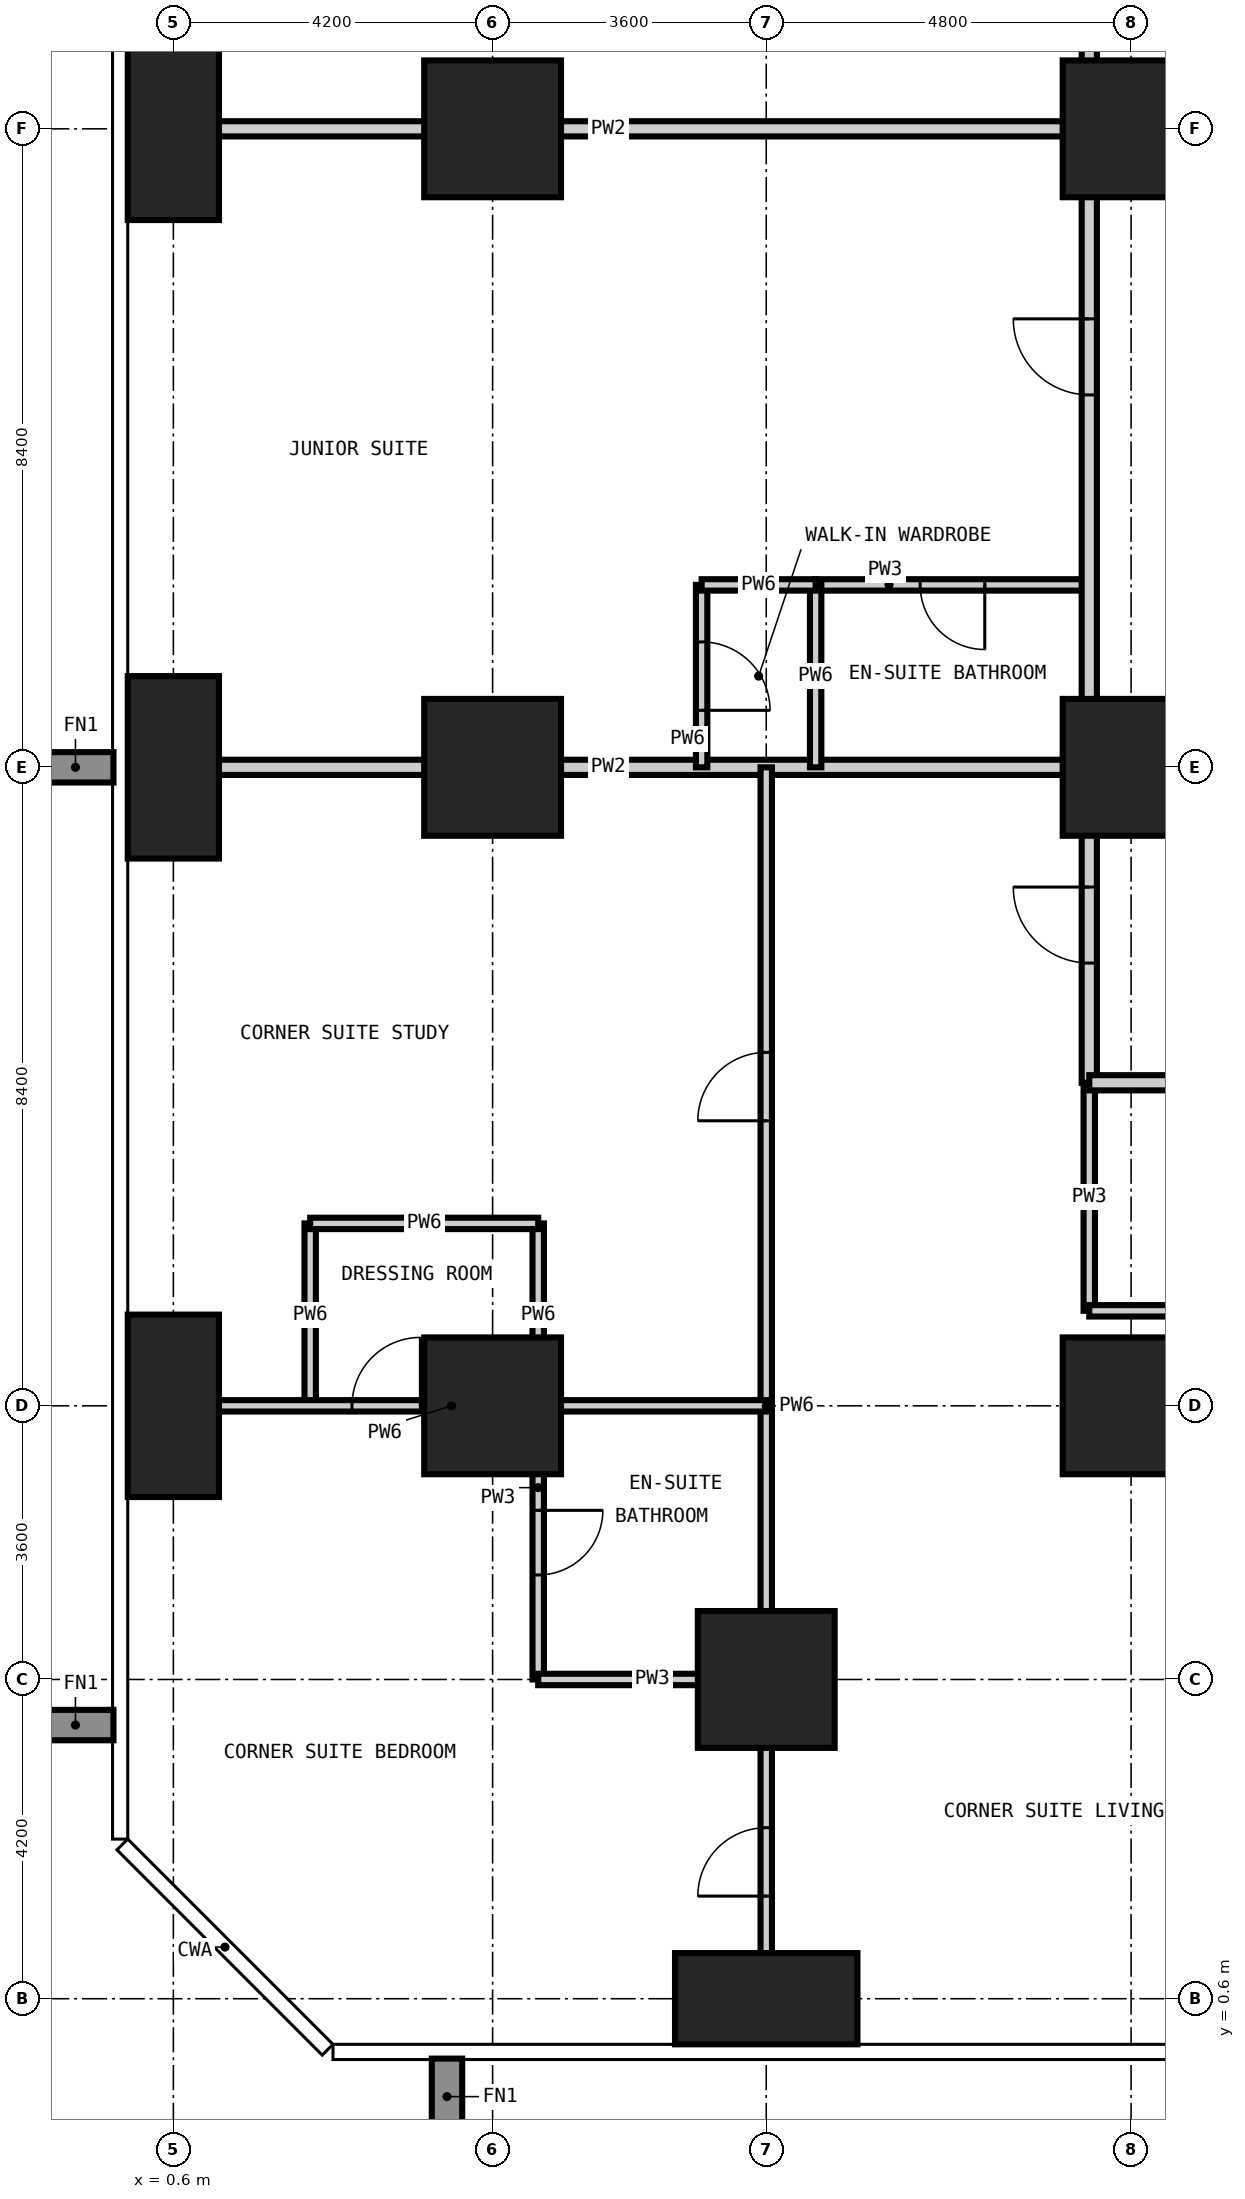
"""IFC4 building model, lengths in metres.
Left out: names, types, materials, properties, quantities, classifications, styles, units other than length and angle.
Written with IfcOpenShell. Run it as: python <this file> out.ifc"""

import sys

from ifc_helpers import new_model, si_unit, direction, frame, frame_2d, origin, origin_2d, place, context, subcontext, project, spatial, rectangle, extrude, element, fill, save


model = new_model("IFC4")
c1 = context("Model", 3, precision=1e-05, world=origin(), true_north=direction((0.0, 1.0)))
c2 = subcontext(c1, "Body", "Model", "MODEL_VIEW")
j1 = project(units=[si_unit("LENGTHUNIT", "METRE"), si_unit("PLANEANGLEUNIT", "RADIAN")], contexts=[c1])
p1 = place(None, origin())
s1 = spatial("IfcSite", under=j1, at=p1, CompositionType="ELEMENT")
p2 = place(p1, origin())
s2 = spatial("IfcBuilding", under=s1, at=p2, CompositionType="ELEMENT")
p3 = place(p2, frame((0.0, 0.0, 70.2)))
s3 = spatial("IfcBuildingStorey", under=s2, at=p3, CompositionType="ELEMENT", Elevation=70.2)
for number, where, z_axis, x_axis in (
    (1, (0.6, 8.4, -0.35), (0.0, 0.0, 1.0), (1.0, 0.0, 0.0)),
    (2, (0.6, 16.8, -0.35), (0.0, 0.0, 1.0), (1.0, 0.0, 0.0)),
    (3, (0.6, 25.2, -0.35), (0.0, 0.0, 1.0), (1.0, 0.0, 0.0)),
):
    element("IfcColumn", number, at=place(p3, frame(where, z_axis=z_axis, x_axis=x_axis)), inside=s3, PredefinedType="COLUMN", context=c2, shape_type="SweptSolid", body=[
        extrude(rectangle(XDim=1.2, YDim=2.4, at=origin_2d()), origin(), (0.0, 0.0, 1.0), 3.6),
    ])
for number, where, z_axis, x_axis in (
    (4, (4.8, 8.4, -0.35), (0.0, 0.0, 1.0), (1.0, 0.0, 0.0)),
    (5, (4.8, 16.8, -0.35), (0.0, 0.0, 1.0), (1.0, 0.0, 0.0)),
    (6, (4.8, 25.2, -0.35), (0.0, 0.0, 1.0), (1.0, 0.0, 0.0)),
):
    element("IfcColumn", number, at=place(p3, frame(where, z_axis=z_axis, x_axis=x_axis)), inside=s3, PredefinedType="COLUMN", context=c2, shape_type="SweptSolid", body=[
        extrude(rectangle(XDim=1.8, YDim=1.8, at=origin_2d()), origin(), (0.0, 0.0, 1.0), 3.6),
    ])
p4 = place(p3, frame((8.4, 0.6, -0.35), z_axis=(0.0, 0.0, 1.0), x_axis=(1.0, 0.0, 0.0)))
e7 = element("IfcColumn", 7, at=p4, inside=s3, PredefinedType="COLUMN", context=c2, shape_type="SweptSolid", body=[
    extrude(rectangle(XDim=2.4, YDim=1.2, at=origin_2d()), origin(), (0.0, 0.0, 1.0), 3.6),
])
for number, where, z_axis, x_axis in (
    (8, (8.4, 4.8, -0.35), (0.0, 0.0, 1.0), (1.0, 0.0, 0.0)),
    (9, (13.2, 8.4, -0.35), (0.0, 0.0, 1.0), (1.0, 0.0, 0.0)),
    (10, (13.2, 16.8, -0.35), (0.0, 0.0, 1.0), (1.0, 0.0, 0.0)),
    (11, (13.2, 25.2, -0.35), (0.0, 0.0, 1.0), (1.0, 0.0, 0.0)),
):
    element("IfcColumn", number, at=place(p3, frame(where, z_axis=z_axis, x_axis=x_axis)), inside=s3, PredefinedType="COLUMN", context=c2, shape_type="SweptSolid", body=[
        extrude(rectangle(XDim=1.8, YDim=1.8, at=origin_2d()), origin(), (0.0, 0.0, 1.0), 3.6),
    ])
p5 = place(p3, frame((5.4, 4.8, 0.0), z_axis=(0.0, 0.0, 1.0), x_axis=(0.0, 1.0, 0.0)))
e12 = element("IfcWall", 12, at=p5, inside=s3, PredefinedType="PARTITIONING", context=c2, shape_type="SweptSolid", body=[
    extrude(rectangle(XDim=3.6, YDim=0.15, at=frame_2d((1.8, 0.0))), origin(), (0.0, 0.0, 1.0), 3.25),
])
p6 = place(p5, frame((1.375, 0.0, 0.0)))
e13 = element("IfcOpeningElement", 13, at=p6, cuts=e12, PredefinedType="OPENING", context=c2, shape_type="SweptSolid", body=[
    extrude(rectangle(XDim=0.85, YDim=2.1, at=frame_2d((0.425, 1.05))), frame((0.0, 0.085, 0.0), z_axis=(0.0, -1.0, 0.0), x_axis=(1.0, 0.0, 0.0)), (0.0, 0.0, 1.0), 0.17),
])
for number, where, z_axis, x_axis in (
    (14, (12.65, 9.65, 0.0), (0.0, 0.0, 1.0), (0.0, 1.0, 0.0)),
    (15, (5.4, 4.8, 0.0), (0.0, 0.0, 1.0), (1.0, 0.0, 0.0)),
):
    element("IfcWall", number, at=place(p3, frame(where, z_axis=z_axis, x_axis=x_axis)), inside=s3, PredefinedType="PARTITIONING", context=c2, shape_type="SweptSolid", body=[
        extrude(rectangle(XDim=3.0, YDim=0.15, at=frame_2d((1.5, 0.0))), origin(), (0.0, 0.0, 1.0), 3.25),
    ])
p7 = place(p3, frame((12.65, 9.65, 0.0), z_axis=(0.0, 0.0, 1.0), x_axis=(1.0, 0.0, 0.0)))
e16 = element("IfcWall", 16, at=p7, inside=s3, PredefinedType="PARTITIONING", context=c2, shape_type="SweptSolid", body=[
    extrude(rectangle(XDim=4.15, YDim=0.15, at=frame_2d((2.075, 0.0))), origin(), (0.0, 0.0, 1.0), 3.25),
])
p8 = place(p7, frame((1.65, 0.0, 0.0)))
e17 = element("IfcOpeningElement", 17, at=p8, cuts=e16, PredefinedType="OPENING", context=c2, shape_type="SweptSolid", body=[
    extrude(rectangle(XDim=0.85, YDim=2.1, at=frame_2d((0.425, 1.05))), frame((0.0, 0.085, 0.0), z_axis=(0.0, -1.0, 0.0), x_axis=(1.0, 0.0, 0.0)), (0.0, 0.0, 1.0), 0.17),
])
p9 = place(p3, frame((9.05, 19.2, 0.0), z_axis=(0.0, 0.0, 1.0), x_axis=(1.0, 0.0, 0.0)))
e18 = element("IfcWall", 18, at=p9, inside=s3, PredefinedType="PARTITIONING", context=c2, shape_type="SweptSolid", body=[
    extrude(rectangle(XDim=3.6, YDim=0.15, at=frame_2d((1.8, 0.0))), origin(), (0.0, 0.0, 1.0), 3.25),
])
p10 = place(p9, frame((1.375, 0.0, 0.0)))
e19 = element("IfcOpeningElement", 19, at=p10, cuts=e18, PredefinedType="OPENING", context=c2, shape_type="SweptSolid", body=[
    extrude(rectangle(XDim=0.85, YDim=2.1, at=frame_2d((0.425, 1.05))), frame((0.0, 0.085, 0.0), z_axis=(0.0, -1.0, 0.0), x_axis=(1.0, 0.0, 0.0)), (0.0, 0.0, 1.0), 0.17),
])
p11 = place(p3, frame((12.65, 12.65, 0.0), z_axis=(0.0, 0.0, 1.0), x_axis=(0.0, 1.0, 0.0)))
e20 = element("IfcWall", 20, at=p11, inside=s3, PredefinedType="PARTITIONING", context=c2, shape_type="SweptSolid", body=[
    extrude(rectangle(XDim=32.9, YDim=0.2, at=frame_2d((16.45, 0.0))), origin(), (0.0, 0.0, 1.0), 3.25),
])
p12 = place(p11, frame((9.05, 0.0, 0.0)))
e21 = element("IfcOpeningElement", 21, at=p12, cuts=e20, PredefinedType="OPENING", context=c2, shape_type="SweptSolid", body=[
    extrude(rectangle(XDim=1.0, YDim=2.2, at=frame_2d((0.5, 1.1))), frame((0.0, 0.11, 0.0), z_axis=(0.0, -1.0, 0.0), x_axis=(1.0, 0.0, 0.0)), (0.0, 0.0, 1.0), 0.22),
])
p13 = place(p11, frame((15.05, 0.0, 0.0)))
e22 = element("IfcOpeningElement", 22, at=p13, cuts=e20, PredefinedType="OPENING", context=c2, shape_type="SweptSolid", body=[
    extrude(rectangle(XDim=1.0, YDim=2.2, at=frame_2d((0.5, 1.1))), frame((0.0, 0.11, 0.0), z_axis=(0.0, -1.0, 0.0), x_axis=(1.0, 0.0, 0.0)), (0.0, 0.0, 1.0), 0.22),
])
p14 = place(p11, frame((25.85, 0.0, 0.0)))
e23 = element("IfcOpeningElement", 23, at=p14, cuts=e20, PredefinedType="OPENING", context=c2, shape_type="SweptSolid", body=[
    extrude(rectangle(XDim=1.0, YDim=2.2, at=frame_2d((0.5, 1.1))), frame((0.0, 0.11, 0.0), z_axis=(0.0, -1.0, 0.0), x_axis=(1.0, 0.0, 0.0)), (0.0, 0.0, 1.0), 0.22),
])
p15 = place(p11, frame((1.575, 0.0, 0.0)))
e24 = element("IfcOpeningElement", 24, at=p15, cuts=e20, PredefinedType="OPENING", context=c2, shape_type="SweptSolid", body=[
    extrude(rectangle(XDim=1.0, YDim=2.2, at=frame_2d((0.5, 1.1))), frame((0.0, 0.11, 0.0), z_axis=(0.0, -1.0, 0.0), x_axis=(1.0, 0.0, 0.0)), (0.0, 0.0, 1.0), 0.22),
])
p16 = place(p11, frame((30.625, 0.0, 0.0)))
e25 = element("IfcOpeningElement", 25, at=p16, cuts=e20, PredefinedType="OPENING", context=c2, shape_type="SweptSolid", body=[
    extrude(rectangle(XDim=1.0, YDim=2.2, at=frame_2d((0.5, 1.1))), frame((0.0, 0.11, 0.0), z_axis=(0.0, -1.0, 0.0), x_axis=(1.0, 0.0, 0.0)), (0.0, 0.0, 1.0), 0.22),
])
p17 = place(p3, frame((44.95, 12.65, 0.0), z_axis=(0.0, 0.0, 1.0), x_axis=(-1.0, 0.0, 0.0)))
e26 = element("IfcWall", 26, at=p17, inside=s3, PredefinedType="PARTITIONING", context=c2, shape_type="SweptSolid", body=[
    extrude(rectangle(XDim=32.3, YDim=0.2, at=frame_2d((16.15, 0.0))), origin(), (0.0, 0.0, 1.0), 3.25),
])
p18 = place(p17, frame((24.35, 0.0, 0.0)))
e27 = element("IfcOpeningElement", 27, at=p18, cuts=e26, PredefinedType="OPENING", context=c2, shape_type="SweptSolid", body=[
    extrude(rectangle(XDim=1.0, YDim=2.2, at=frame_2d((0.5, 1.1))), frame((0.0, 0.11, 0.0), z_axis=(0.0, -1.0, 0.0), x_axis=(1.0, 0.0, 0.0)), (0.0, 0.0, 1.0), 0.22),
])
p19 = place(p17, frame((22.55, 0.0, 0.0)))
e28 = element("IfcOpeningElement", 28, at=p19, cuts=e26, PredefinedType="OPENING", context=c2, shape_type="SweptSolid", body=[
    extrude(rectangle(XDim=1.0, YDim=2.2, at=frame_2d((0.5, 1.1))), frame((0.0, 0.11, 0.0), z_axis=(0.0, -1.0, 0.0), x_axis=(1.0, 0.0, 0.0)), (0.0, 0.0, 1.0), 0.22),
])
p20 = place(p17, frame((15.95, 0.0, 0.0)))
e29 = element("IfcOpeningElement", 29, at=p20, cuts=e26, PredefinedType="OPENING", context=c2, shape_type="SweptSolid", body=[
    extrude(rectangle(XDim=1.0, YDim=2.2, at=frame_2d((0.5, 1.1))), frame((0.0, 0.11, 0.0), z_axis=(0.0, -1.0, 0.0), x_axis=(1.0, 0.0, 0.0)), (0.0, 0.0, 1.0), 0.22),
])
p21 = place(p17, frame((14.15, 0.0, 0.0)))
e30 = element("IfcOpeningElement", 30, at=p21, cuts=e26, PredefinedType="OPENING", context=c2, shape_type="SweptSolid", body=[
    extrude(rectangle(XDim=1.0, YDim=2.2, at=frame_2d((0.5, 1.1))), frame((0.0, 0.11, 0.0), z_axis=(0.0, -1.0, 0.0), x_axis=(1.0, 0.0, 0.0)), (0.0, 0.0, 1.0), 0.22),
])
p22 = place(p17, frame((7.55, 0.0, 0.0)))
e31 = element("IfcOpeningElement", 31, at=p22, cuts=e26, PredefinedType="OPENING", context=c2, shape_type="SweptSolid", body=[
    extrude(rectangle(XDim=1.0, YDim=2.2, at=frame_2d((0.5, 1.1))), frame((0.0, 0.11, 0.0), z_axis=(0.0, -1.0, 0.0), x_axis=(1.0, 0.0, 0.0)), (0.0, 0.0, 1.0), 0.22),
])
p23 = place(p17, frame((5.75, 0.0, 0.0)))
e32 = element("IfcOpeningElement", 32, at=p23, cuts=e26, PredefinedType="OPENING", context=c2, shape_type="SweptSolid", body=[
    extrude(rectangle(XDim=1.0, YDim=2.2, at=frame_2d((0.5, 1.1))), frame((0.0, 0.11, 0.0), z_axis=(0.0, -1.0, 0.0), x_axis=(1.0, 0.0, 0.0)), (0.0, 0.0, 1.0), 0.22),
])
for number, where, z_axis, x_axis in (
    (33, (-0.008, 16.8, 0.0), (0.0, 0.0, 1.0), (1.0, 0.0, 0.0)),
    (34, (-0.008, 25.2, 0.0), (0.0, 0.0, 1.0), (1.0, 0.0, 0.0)),
):
    element("IfcWall", number, at=place(p3, frame(where, z_axis=z_axis, x_axis=x_axis)), inside=s3, PredefinedType="PARTITIONING", context=c2, shape_type="SweptSolid", body=[
        extrude(rectangle(XDim=12.658, YDim=0.2, at=frame_2d((6.329, 0.0))), origin(), (0.0, 0.0, 1.0), 3.25),
    ])
for number, where, z_axis, x_axis in (
    (35, (2.4, 8.4, 0.0), (0.0, 0.0, 1.0), (0.0, 1.0, 0.0)),
    (36, (5.4, 8.4, 0.0), (0.0, 0.0, 1.0), (0.0, 1.0, 0.0)),
):
    element("IfcWall", number, at=place(p3, frame(where, z_axis=z_axis, x_axis=x_axis)), inside=s3, PredefinedType="PARTITIONING", context=c2, shape_type="SweptSolid", body=[
        extrude(rectangle(XDim=2.4, YDim=0.15, at=frame_2d((1.2, 0.0))), origin(), (0.0, 0.0, 1.0), 3.25),
    ])
p24 = place(p3, frame((7.55, 16.8, 0.0), z_axis=(0.0, 0.0, 1.0), x_axis=(0.0, 1.0, 0.0)))
e37 = element("IfcWall", 37, at=p24, inside=s3, PredefinedType="PARTITIONING", context=c2, shape_type="SweptSolid", body=[
    extrude(rectangle(XDim=2.4, YDim=0.15, at=frame_2d((1.2, 0.0))), origin(), (0.0, 0.0, 1.0), 3.25),
])
p25 = place(p24, frame((0.75, 0.0, 0.0)))
e38 = element("IfcOpeningElement", 38, at=p25, cuts=e37, PredefinedType="OPENING", context=c2, shape_type="SweptSolid", body=[
    extrude(rectangle(XDim=0.9, YDim=2.1, at=frame_2d((0.45, 1.05))), frame((0.0, 0.085, 0.0), z_axis=(0.0, -1.0, 0.0), x_axis=(1.0, 0.0, 0.0)), (0.0, 0.0, 1.0), 0.17),
])
p26 = place(p3, frame((8.4, -0.008, 0.0), z_axis=(0.0, 0.0, 1.0), x_axis=(0.0, 1.0, 0.0)))
e39 = element("IfcWall", 39, at=p26, inside=s3, PredefinedType="PARTITIONING", context=c2, shape_type="SweptSolid", body=[
    extrude(rectangle(XDim=16.808, YDim=0.15, at=frame_2d((8.404, 0.0))), origin(), (0.0, 0.0, 1.0), 3.25),
])
p27 = place(p26, frame((1.958, 0.0, 0.0)))
e40 = element("IfcOpeningElement", 40, at=p27, cuts=e39, PredefinedType="OPENING", context=c2, shape_type="SweptSolid", body=[
    extrude(rectangle(XDim=0.9, YDim=2.1, at=frame_2d((0.45, 1.05))), frame((0.0, 0.085, 0.0), z_axis=(0.0, -1.0, 0.0), x_axis=(1.0, 0.0, 0.0)), (0.0, 0.0, 1.0), 0.17),
])
p28 = place(p26, frame((12.158, 0.0, 0.0)))
e41 = element("IfcOpeningElement", 41, at=p28, cuts=e39, PredefinedType="OPENING", context=c2, shape_type="SweptSolid", body=[
    extrude(rectangle(XDim=0.9, YDim=2.1, at=frame_2d((0.45, 1.05))), frame((0.0, 0.085, 0.0), z_axis=(0.0, -1.0, 0.0), x_axis=(1.0, 0.0, 0.0)), (0.0, 0.0, 1.0), 0.17),
])
p29 = place(p3, frame((9.05, 16.8, 0.0), z_axis=(0.0, 0.0, 1.0), x_axis=(0.0, 1.0, 0.0)))
e42 = element("IfcWall", 42, at=p29, inside=s3, PredefinedType="PARTITIONING", context=c2, shape_type="SweptSolid", body=[
    extrude(rectangle(XDim=2.4, YDim=0.15, at=frame_2d((1.2, 0.0))), origin(), (0.0, 0.0, 1.0), 3.25),
])
p30 = place(p3, frame((-0.008, 8.4, 0.0), z_axis=(0.0, 0.0, 1.0), x_axis=(1.0, 0.0, 0.0)))
e43 = element("IfcWall", 43, at=p30, inside=s3, PredefinedType="PARTITIONING", context=c2, shape_type="SweptSolid", body=[
    extrude(rectangle(XDim=8.408, YDim=0.15, at=frame_2d((4.204, 0.0))), origin(), (0.0, 0.0, 1.0), 3.25),
])
p31 = place(p30, frame((2.958, 0.0, 0.0)))
e44 = element("IfcOpeningElement", 44, at=p31, cuts=e43, PredefinedType="OPENING", context=c2, shape_type="SweptSolid", body=[
    extrude(rectangle(XDim=0.9, YDim=2.1, at=frame_2d((0.45, 1.05))), frame((0.0, 0.085, 0.0), z_axis=(0.0, -1.0, 0.0), x_axis=(1.0, 0.0, 0.0)), (0.0, 0.0, 1.0), 0.17),
])
p32 = place(p3, frame((2.4, 10.8, 0.0), z_axis=(0.0, 0.0, 1.0), x_axis=(1.0, 0.0, 0.0)))
e45 = element("IfcWall", 45, at=p32, inside=s3, PredefinedType="PARTITIONING", context=c2, shape_type="SweptSolid", body=[
    extrude(rectangle(XDim=3.0, YDim=0.15, at=frame_2d((1.5, 0.0))), origin(), (0.0, 0.0, 1.0), 3.25),
])
p33 = place(p3, frame((7.55, 19.2, 0.0), z_axis=(0.0, 0.0, 1.0), x_axis=(1.0, 0.0, 0.0)))
e46 = element("IfcWall", 46, at=p33, inside=s3, PredefinedType="PARTITIONING", context=c2, shape_type="SweptSolid", body=[
    extrude(rectangle(XDim=1.5, YDim=0.15, at=frame_2d((0.75, 0.0))), origin(), (0.0, 0.0, 1.0), 3.25),
])
p34 = place(p12, origin())
e47 = element("IfcDoor", 47, at=p34, inside=s3, OperationType="SINGLE_SWING_RIGHT", PredefinedType="DOOR", context=c2, shape_type="SweptSolid", body=[
    extrude(rectangle(XDim=1.0, YDim=2.2, at=frame_2d((0.5, 1.1))), frame((0.0, 0.025, 0.0), z_axis=(0.0, -1.0, 0.0), x_axis=(1.0, 0.0, 0.0)), (0.0, 0.0, 1.0), 0.05),
])
fill(e21, e47)
p35 = place(p10, frame((0.85, 0.0, 0.0), z_axis=(0.0, 0.0, 1.0), x_axis=(-1.0, 0.0, 0.0)))
e48 = element("IfcDoor", 48, at=p35, inside=s3, OperationType="SINGLE_SWING_LEFT", PredefinedType="DOOR", context=c2, shape_type="SweptSolid", body=[
    extrude(rectangle(XDim=0.85, YDim=2.1, at=frame_2d((0.425, 1.05))), frame((0.0, 0.025, 0.0), z_axis=(0.0, -1.0, 0.0), x_axis=(1.0, 0.0, 0.0)), (0.0, 0.0, 1.0), 0.05),
])
fill(e19, e48)
p36 = place(p25, frame((0.9, 0.0, 0.0), z_axis=(0.0, 0.0, 1.0), x_axis=(-1.0, 0.0, 0.0)))
e49 = element("IfcDoor", 49, at=p36, inside=s3, OperationType="SINGLE_SWING_RIGHT", PredefinedType="DOOR", context=c2, shape_type="SweptSolid", body=[
    extrude(rectangle(XDim=0.9, YDim=2.1, at=frame_2d((0.45, 1.05))), frame((0.0, 0.025, 0.0), z_axis=(0.0, -1.0, 0.0), x_axis=(1.0, 0.0, 0.0)), (0.0, 0.0, 1.0), 0.05),
])
fill(e38, e49)
p37 = place(p15, origin())
e50 = element("IfcDoor", 50, at=p37, inside=s3, OperationType="SINGLE_SWING_RIGHT", PredefinedType="DOOR", context=c2, shape_type="SweptSolid", body=[
    extrude(rectangle(XDim=1.0, YDim=2.2, at=frame_2d((0.5, 1.1))), frame((0.0, 0.025, 0.0), z_axis=(0.0, -1.0, 0.0), x_axis=(1.0, 0.0, 0.0)), (0.0, 0.0, 1.0), 0.05),
])
fill(e24, e50)
p38 = place(p27, origin())
e51 = element("IfcDoor", 51, at=p38, inside=s3, OperationType="SINGLE_SWING_LEFT", PredefinedType="DOOR", context=c2, shape_type="SweptSolid", body=[
    extrude(rectangle(XDim=0.9, YDim=2.1, at=frame_2d((0.45, 1.05))), frame((0.0, 0.025, 0.0), z_axis=(0.0, -1.0, 0.0), x_axis=(1.0, 0.0, 0.0)), (0.0, 0.0, 1.0), 0.05),
])
fill(e40, e51)
p39 = place(p6, frame((0.85, 0.0, 0.0), z_axis=(0.0, 0.0, 1.0), x_axis=(-1.0, 0.0, 0.0)))
e52 = element("IfcDoor", 52, at=p39, inside=s3, OperationType="SINGLE_SWING_LEFT", PredefinedType="DOOR", context=c2, shape_type="SweptSolid", body=[
    extrude(rectangle(XDim=0.85, YDim=2.1, at=frame_2d((0.425, 1.05))), frame((0.0, 0.025, 0.0), z_axis=(0.0, -1.0, 0.0), x_axis=(1.0, 0.0, 0.0)), (0.0, 0.0, 1.0), 0.05),
])
fill(e13, e52)
p40 = place(p31, origin())
e53 = element("IfcDoor", 53, at=p40, inside=s3, OperationType="SINGLE_SWING_RIGHT", PredefinedType="DOOR", context=c2, shape_type="SweptSolid", body=[
    extrude(rectangle(XDim=0.9, YDim=2.1, at=frame_2d((0.45, 1.05))), frame((0.0, 0.025, 0.0), z_axis=(0.0, -1.0, 0.0), x_axis=(1.0, 0.0, 0.0)), (0.0, 0.0, 1.0), 0.05),
])
fill(e44, e53)
p41 = place(p28, origin())
e54 = element("IfcDoor", 54, at=p41, inside=s3, OperationType="SINGLE_SWING_LEFT", PredefinedType="DOOR", context=c2, shape_type="SweptSolid", body=[
    extrude(rectangle(XDim=0.9, YDim=2.1, at=frame_2d((0.45, 1.05))), frame((0.0, 0.025, 0.0), z_axis=(0.0, -1.0, 0.0), x_axis=(1.0, 0.0, 0.0)), (0.0, 0.0, 1.0), 0.05),
])
fill(e41, e54)
save(model, sys.argv[1])
